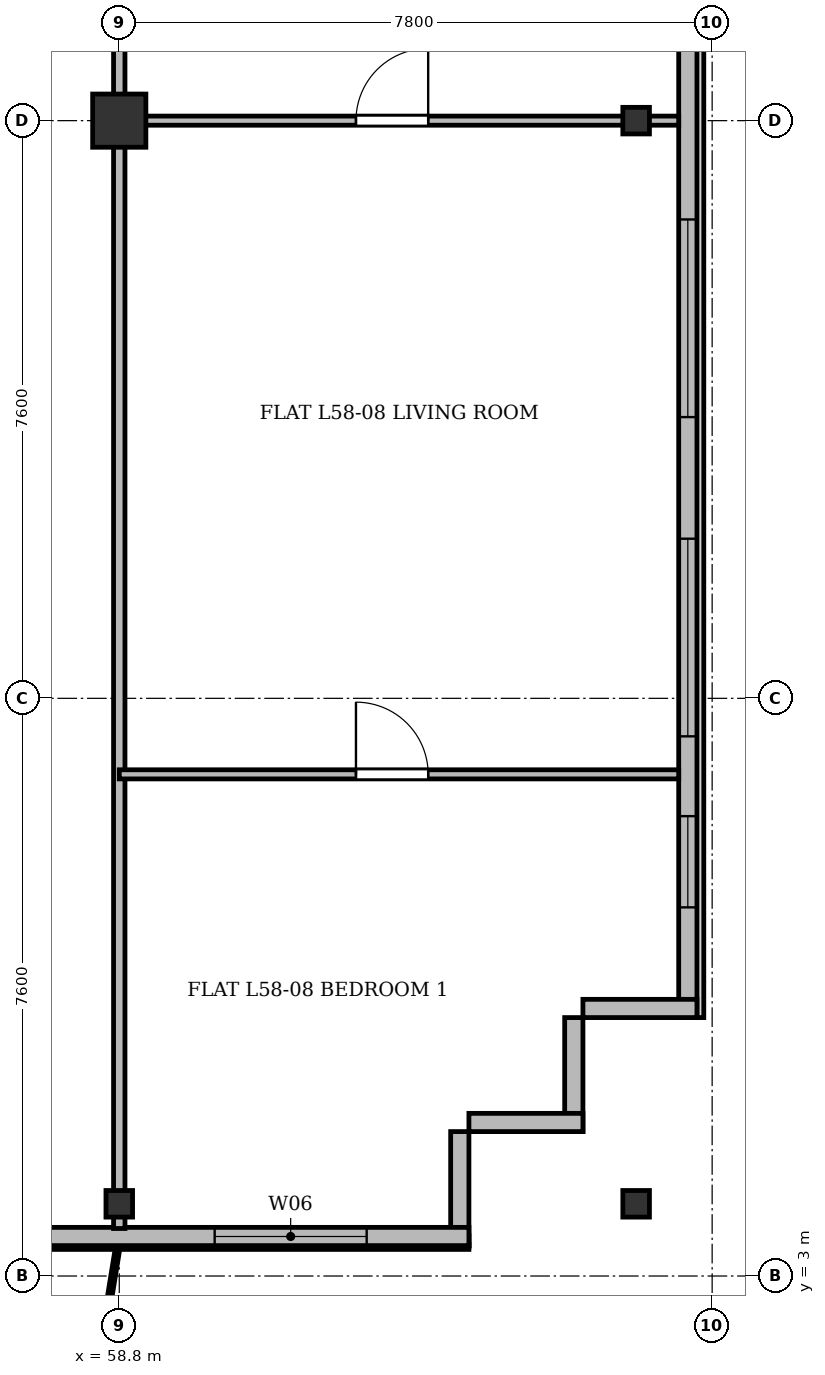
"""IFC4 building model, lengths in metres.
Left out: names, types, materials, properties, quantities, classifications, styles, units other than length and angle.
Written with IfcOpenShell. Run it as: python <this file> out.ifc"""

import sys

from ifc_helpers import new_model, si_unit, direction, frame, frame_2d, origin, origin_2d, place, context, subcontext, project, spatial, rectangle, i_section, extrude, source, transform, mapped, element, fill, save


model = new_model("IFC4")
c1 = context("Model", 3, precision=1e-05, world=origin(), true_north=direction((0.0, 1.0)))
c2 = subcontext(c1, "Body", "Model", "MODEL_VIEW")
j1 = project(units=[si_unit("LENGTHUNIT", "METRE"), si_unit("PLANEANGLEUNIT", "RADIAN")], contexts=[c1])
p1 = place(None, origin())
s1 = spatial("IfcSite", under=j1, at=p1, CompositionType="ELEMENT")
p2 = place(p1, origin())
s2 = spatial("IfcBuilding", under=s1, at=p2, CompositionType="ELEMENT")
p3 = place(p2, frame((0.0, 0.0, 222.9)))
s3 = spatial("IfcBuildingStorey", under=s2, at=p3, CompositionType="ELEMENT", Elevation=222.9)
m1 = source(origin(), c2, "Body", "SweptSolid", [
    extrude(i_section(OverallWidth=0.35, OverallDepth=0.35, WebThickness=0.018, FlangeThickness=0.028, at=origin_2d()), origin(), (0.0, 0.0, 1.0), 3.6),
])
p4 = place(p3, frame((58.8, 3.95, 0.0), z_axis=(0.0, 0.0, 1.0), x_axis=(1.0, 0.0, 0.0)))
e1 = element("IfcColumn", 1, at=p4, inside=s3, PredefinedType="COLUMN", context=c2, shape_type="MappedRepresentation", body=[
    mapped(m1, transform((0.0, 0.0, 0.0), x_axis=(1.0, 0.0, 0.0), y_axis=(0.0, 1.0, 0.0), z_axis=(0.0, 0.0, 1.0), scale=1.0)),
])
m2 = source(origin(), c2, "Body", "SweptSolid", [
    extrude(rectangle(XDim=0.7, YDim=0.7, at=origin_2d()), origin(), (0.0, 0.0, 1.0), 3.6),
])
p5 = place(p3, frame((58.8, 18.2, 0.0), z_axis=(0.0, 0.0, 1.0), x_axis=(1.0, 0.0, 0.0)))
e2 = element("IfcColumn", 2, at=p5, inside=s3, PredefinedType="COLUMN", context=c2, shape_type="MappedRepresentation", body=[
    mapped(m2, transform((0.0, 0.0, 0.0), x_axis=(1.0, 0.0, 0.0), y_axis=(0.0, 1.0, 0.0), z_axis=(0.0, 0.0, 1.0), scale=1.0)),
])
for number, where, z_axis, x_axis in (
    (3, (65.6, 3.95, 0.0), (0.0, 0.0, 1.0), (1.0, 0.0, 0.0)),
    (4, (65.6, 18.2, 0.0), (0.0, 0.0, 1.0), (1.0, 0.0, 0.0)),
):
    element("IfcColumn", number, at=place(p3, frame(where, z_axis=z_axis, x_axis=x_axis)), inside=s3, PredefinedType="COLUMN", context=c2, shape_type="MappedRepresentation", body=[
        mapped(m1, transform((0.0, 0.0, 0.0), x_axis=(1.0, 0.0, 0.0), y_axis=(0.0, 1.0, 0.0), z_axis=(0.0, 0.0, 1.0), scale=1.0)),
    ])
p6 = place(p3, frame((66.28, 45.5, 0.0), z_axis=(0.0, 0.0, 1.0), x_axis=(0.0, -1.0, 0.0)))
e5 = element("IfcWall", 5, at=p6, inside=s3, PredefinedType="SOLIDWALL", context=c2, shape_type="SweptSolid", body=[
    extrude(rectangle(XDim=39.1, YDim=0.24, at=frame_2d((19.55, 0.0))), origin(), (0.0, 0.0, 1.0), 3.36),
])
p7 = place(p6, frame((36.45, 0.0, 0.92)))
e6 = element("IfcOpeningElement", 6, at=p7, cuts=e5, PredefinedType="OPENING", context=c2, shape_type="SweptSolid", body=[
    extrude(rectangle(XDim=1.2, YDim=1.65, at=frame_2d((0.6, 0.825))), frame((0.0, 0.13, 0.0), z_axis=(0.0, -1.0, 0.0), x_axis=(1.0, 0.0, 0.0)), (0.0, 0.0, 1.0), 0.26),
])
p8 = place(p6, frame((32.8, 0.0, 0.92)))
e7 = element("IfcOpeningElement", 7, at=p8, cuts=e5, PredefinedType="OPENING", context=c2, shape_type="SweptSolid", body=[
    extrude(rectangle(XDim=2.6, YDim=1.9, at=frame_2d((1.3, 0.95))), frame((0.0, 0.13, 0.0), z_axis=(0.0, -1.0, 0.0), x_axis=(1.0, 0.0, 0.0)), (0.0, 0.0, 1.0), 0.26),
])
p9 = place(p6, frame((28.6, 0.0, 0.92)))
e8 = element("IfcOpeningElement", 8, at=p9, cuts=e5, PredefinedType="OPENING", context=c2, shape_type="SweptSolid", body=[
    extrude(rectangle(XDim=2.6, YDim=1.9, at=frame_2d((1.3, 0.95))), frame((0.0, 0.13, 0.0), z_axis=(0.0, -1.0, 0.0), x_axis=(1.0, 0.0, 0.0)), (0.0, 0.0, 1.0), 0.26),
])
p10 = place(p6, frame((21.4, 0.0, 0.92)))
e9 = element("IfcOpeningElement", 9, at=p10, cuts=e5, PredefinedType="OPENING", context=c2, shape_type="SweptSolid", body=[
    extrude(rectangle(XDim=2.6, YDim=1.9, at=frame_2d((1.3, 0.95))), frame((0.0, 0.13, 0.0), z_axis=(0.0, -1.0, 0.0), x_axis=(1.0, 0.0, 0.0)), (0.0, 0.0, 1.0), 0.26),
])
p11 = place(p6, frame((7.4, 0.0, 0.92)))
e10 = element("IfcOpeningElement", 10, at=p11, cuts=e5, PredefinedType="OPENING", context=c2, shape_type="SweptSolid", body=[
    extrude(rectangle(XDim=2.6, YDim=1.9, at=frame_2d((1.3, 0.95))), frame((0.0, 0.13, 0.0), z_axis=(0.0, -1.0, 0.0), x_axis=(1.0, 0.0, 0.0)), (0.0, 0.0, 1.0), 0.26),
])
p12 = place(p6, frame((4.5, 0.0, 0.92)))
e11 = element("IfcOpeningElement", 11, at=p12, cuts=e5, PredefinedType="OPENING", context=c2, shape_type="SweptSolid", body=[
    extrude(rectangle(XDim=1.2, YDim=1.65, at=frame_2d((0.6, 0.825))), frame((0.0, 0.13, 0.0), z_axis=(0.0, -1.0, 0.0), x_axis=(1.0, 0.0, 0.0)), (0.0, 0.0, 1.0), 0.26),
])
p13 = place(p6, frame((1.15, 0.0, 0.92)))
e12 = element("IfcOpeningElement", 12, at=p13, cuts=e5, PredefinedType="OPENING", context=c2, shape_type="SweptSolid", body=[
    extrude(rectangle(XDim=1.2, YDim=1.65, at=frame_2d((0.6, 0.825))), frame((0.0, 0.13, 0.0), z_axis=(0.0, -1.0, 0.0), x_axis=(1.0, 0.0, 0.0)), (0.0, 0.0, 1.0), 0.26),
])
p14 = place(p3, frame((66.4, 6.52, 0.0), z_axis=(0.0, 0.0, 1.0), x_axis=(-1.0, 0.0, 0.0)))
e13 = element("IfcWall", 13, at=p14, inside=s3, PredefinedType="SOLIDWALL", context=c2, shape_type="SweptSolid", body=[
    extrude(rectangle(XDim=1.5, YDim=0.24, at=frame_2d((0.75, 0.0))), origin(), (0.0, 0.0, 1.0), 2.86),
])
for number, where, z_axis, x_axis in (
    (14, (64.78, 6.4, 0.0), (0.0, 0.0, 1.0), (0.0, -1.0, 0.0)),
    (15, (64.9, 5.02, 0.0), (0.0, 0.0, 1.0), (-1.0, 0.0, 0.0)),
):
    element("IfcWall", number, at=place(p3, frame(where, z_axis=z_axis, x_axis=x_axis)), inside=s3, PredefinedType="SOLIDWALL", context=c2, shape_type="SweptSolid", body=[
        extrude(rectangle(XDim=1.5, YDim=0.24, at=frame_2d((0.75, 0.0))), origin(), (0.0, 0.0, 1.0), 3.36),
    ])
p15 = place(p3, frame((63.28, 4.9, 0.0), z_axis=(0.0, 0.0, 1.0), x_axis=(0.0, -1.0, 0.0)))
e16 = element("IfcWall", 16, at=p15, inside=s3, PredefinedType="SOLIDWALL", context=c2, shape_type="SweptSolid", body=[
    extrude(rectangle(XDim=1.5, YDim=0.24, at=frame_2d((0.75, 0.0))), origin(), (0.0, 0.0, 1.0), 2.91),
])
p16 = place(p3, frame((63.4, 3.52, 0.0), z_axis=(0.0, 0.0, 1.0), x_axis=(-1.0, 0.0, 0.0)))
e17 = element("IfcWall", 17, at=p16, inside=s3, PredefinedType="SOLIDWALL", context=c2, shape_type="SweptSolid", body=[
    extrude(rectangle(XDim=52.4, YDim=0.24, at=frame_2d((26.2, 0.0))), origin(), (0.0, 0.0, 1.0), 3.36),
])
p17 = place(p16, frame((1.345, 0.0, 0.9)))
e18 = element("IfcOpeningElement", 18, at=p17, cuts=e17, PredefinedType="OPENING", context=c2, shape_type="SweptSolid", body=[
    extrude(rectangle(XDim=2.0, YDim=1.95, at=frame_2d((1.0, 0.975))), frame((0.0, 0.13, 0.0), z_axis=(0.0, -1.0, 0.0), x_axis=(1.0, 0.0, 0.0)), (0.0, 0.0, 1.0), 0.26),
])
p18 = place(p16, frame((7.675, 0.0, 0.9)))
e19 = element("IfcOpeningElement", 19, at=p18, cuts=e17, PredefinedType="OPENING", context=c2, shape_type="SweptSolid", body=[
    extrude(rectangle(XDim=1.65, YDim=1.85, at=frame_2d((0.825, 0.925))), frame((0.0, 0.13, 0.0), z_axis=(0.0, -1.0, 0.0), x_axis=(1.0, 0.0, 0.0)), (0.0, 0.0, 1.0), 0.26),
])
p19 = place(p16, frame((13.42, 0.0, 0.0)))
e20 = element("IfcOpeningElement", 20, at=p19, cuts=e17, PredefinedType="OPENING", context=c2, shape_type="SweptSolid", body=[
    extrude(rectangle(XDim=1.2, YDim=2.2, at=frame_2d((0.6, 1.1))), frame((0.0, 0.13, 0.0), z_axis=(0.0, -1.0, 0.0), x_axis=(1.0, 0.0, 0.0)), (0.0, 0.0, 1.0), 0.26),
])
p20 = place(p16, frame((15.25, 0.0, 0.9)))
e21 = element("IfcOpeningElement", 21, at=p20, cuts=e17, PredefinedType="OPENING", context=c2, shape_type="SweptSolid", body=[
    extrude(rectangle(XDim=1.5, YDim=1.75, at=frame_2d((0.75, 0.875))), frame((0.0, 0.13, 0.0), z_axis=(0.0, -1.0, 0.0), x_axis=(1.0, 0.0, 0.0)), (0.0, 0.0, 1.0), 0.26),
])
p21 = place(p16, frame((17.65, 0.0, 0.9)))
e22 = element("IfcOpeningElement", 22, at=p21, cuts=e17, PredefinedType="OPENING", context=c2, shape_type="SweptSolid", body=[
    extrude(rectangle(XDim=1.5, YDim=1.75, at=frame_2d((0.75, 0.875))), frame((0.0, 0.13, 0.0), z_axis=(0.0, -1.0, 0.0), x_axis=(1.0, 0.0, 0.0)), (0.0, 0.0, 1.0), 0.26),
])
p22 = place(p16, frame((20.25, 0.0, 0.9)))
e23 = element("IfcOpeningElement", 23, at=p22, cuts=e17, PredefinedType="OPENING", context=c2, shape_type="SweptSolid", body=[
    extrude(rectangle(XDim=2.0, YDim=1.95, at=frame_2d((1.0, 0.975))), frame((0.0, 0.13, 0.0), z_axis=(0.0, -1.0, 0.0), x_axis=(1.0, 0.0, 0.0)), (0.0, 0.0, 1.0), 0.26),
])
p23 = place(p16, frame((23.725, 0.0, 0.9)))
e24 = element("IfcOpeningElement", 24, at=p23, cuts=e17, PredefinedType="OPENING", context=c2, shape_type="SweptSolid", body=[
    extrude(rectangle(XDim=1.65, YDim=1.85, at=frame_2d((0.825, 0.925))), frame((0.0, 0.13, 0.0), z_axis=(0.0, -1.0, 0.0), x_axis=(1.0, 0.0, 0.0)), (0.0, 0.0, 1.0), 0.26),
])
p24 = place(p16, frame((28.6, 0.0, 0.9)))
e25 = element("IfcOpeningElement", 25, at=p24, cuts=e17, PredefinedType="OPENING", context=c2, shape_type="SweptSolid", body=[
    extrude(rectangle(XDim=1.8, YDim=1.8, at=frame_2d((0.9, 0.9))), frame((0.0, 0.13, 0.0), z_axis=(0.0, -1.0, 0.0), x_axis=(1.0, 0.0, 0.0)), (0.0, 0.0, 1.0), 0.26),
])
p25 = place(p16, frame((33.5, 0.0, 0.9)))
e26 = element("IfcOpeningElement", 26, at=p25, cuts=e17, PredefinedType="OPENING", context=c2, shape_type="SweptSolid", body=[
    extrude(rectangle(XDim=2.2, YDim=1.8, at=frame_2d((1.1, 0.9))), frame((0.0, 0.13, 0.0), z_axis=(0.0, -1.0, 0.0), x_axis=(1.0, 0.0, 0.0)), (0.0, 0.0, 1.0), 0.26),
])
p26 = place(p16, frame((37.45, 0.0, 0.9)))
e27 = element("IfcOpeningElement", 27, at=p26, cuts=e17, PredefinedType="OPENING", context=c2, shape_type="SweptSolid", body=[
    extrude(rectangle(XDim=1.5, YDim=1.75, at=frame_2d((0.75, 0.875))), frame((0.0, 0.13, 0.0), z_axis=(0.0, -1.0, 0.0), x_axis=(1.0, 0.0, 0.0)), (0.0, 0.0, 1.0), 0.26),
])
p27 = place(p16, frame((41.09, 0.0, 0.0)))
e28 = element("IfcOpeningElement", 28, at=p27, cuts=e17, PredefinedType="OPENING", context=c2, shape_type="SweptSolid", body=[
    extrude(rectangle(XDim=1.2, YDim=2.2, at=frame_2d((0.6, 1.1))), frame((0.0, 0.13, 0.0), z_axis=(0.0, -1.0, 0.0), x_axis=(1.0, 0.0, 0.0)), (0.0, 0.0, 1.0), 0.26),
])
p28 = place(p16, frame((43.075, 0.0, 0.9)))
e29 = element("IfcOpeningElement", 29, at=p28, cuts=e17, PredefinedType="OPENING", context=c2, shape_type="SweptSolid", body=[
    extrude(rectangle(XDim=1.65, YDim=1.85, at=frame_2d((0.825, 0.925))), frame((0.0, 0.13, 0.0), z_axis=(0.0, -1.0, 0.0), x_axis=(1.0, 0.0, 0.0)), (0.0, 0.0, 1.0), 0.26),
])
p29 = place(p16, frame((45.6, 0.0, 0.9)))
e30 = element("IfcOpeningElement", 30, at=p29, cuts=e17, PredefinedType="OPENING", context=c2, shape_type="SweptSolid", body=[
    extrude(rectangle(XDim=1.8, YDim=1.8, at=frame_2d((0.9, 0.9))), frame((0.0, 0.13, 0.0), z_axis=(0.0, -1.0, 0.0), x_axis=(1.0, 0.0, 0.0)), (0.0, 0.0, 1.0), 0.26),
])
p30 = place(p16, frame((48.955, 0.0, 0.9)))
e31 = element("IfcOpeningElement", 31, at=p30, cuts=e17, PredefinedType="OPENING", context=c2, shape_type="SweptSolid", body=[
    extrude(rectangle(XDim=2.2, YDim=1.8, at=frame_2d((1.1, 0.9))), frame((0.0, 0.13, 0.0), z_axis=(0.0, -1.0, 0.0), x_axis=(1.0, 0.0, 0.0)), (0.0, 0.0, 1.0), 0.26),
])
p31 = place(p3, frame((58.8, 3.625, 0.0), z_axis=(0.0, 0.0, 1.0), x_axis=(0.0, 1.0, 0.0)))
e32 = element("IfcWall", 32, at=p31, inside=s3, PredefinedType="PARTITIONING", context=c2, shape_type="SweptSolid", body=[
    extrude(rectangle(XDim=27.375, YDim=0.15, at=frame_2d((13.688, 0.0))), origin(), (0.0, 0.0, 1.0), 2.86),
])
p32 = place(p3, frame((58.8, 18.2, 0.0), z_axis=(0.0, 0.0, 1.0), x_axis=(1.0, 0.0, 0.0)))
e33 = element("IfcWall", 33, at=p32, inside=s3, PredefinedType="PARTITIONING", context=c2, shape_type="SweptSolid", body=[
    extrude(rectangle(XDim=7.36, YDim=0.12, at=frame_2d((3.68, 0.0))), origin(), (0.0, 0.0, 1.0), 2.91),
])
p33 = place(p32, frame((3.114, 0.0, 0.0)))
e34 = element("IfcOpeningElement", 34, at=p33, cuts=e33, PredefinedType="OPENING", context=c2, shape_type="SweptSolid", body=[
    extrude(rectangle(XDim=0.95, YDim=2.15, at=frame_2d((0.475, 1.075))), frame((0.0, 0.07, 0.0), z_axis=(0.0, -1.0, 0.0), x_axis=(1.0, 0.0, 0.0)), (0.0, 0.0, 1.0), 0.14),
])
p34 = place(p3, frame((58.8, 9.6, 0.0), z_axis=(0.0, 0.0, 1.0), x_axis=(1.0, 0.0, 0.0)))
e35 = element("IfcWall", 35, at=p34, inside=s3, PredefinedType="PARTITIONING", context=c2, shape_type="SweptSolid", body=[
    extrude(rectangle(XDim=7.36, YDim=0.12, at=frame_2d((3.68, 0.0))), origin(), (0.0, 0.0, 1.0), 2.86),
])
p35 = place(p34, frame((3.114, 0.0, 0.0)))
e36 = element("IfcOpeningElement", 36, at=p35, cuts=e35, PredefinedType="OPENING", context=c2, shape_type="SweptSolid", body=[
    extrude(rectangle(XDim=0.95, YDim=2.15, at=frame_2d((0.475, 1.075))), frame((0.0, 0.07, 0.0), z_axis=(0.0, -1.0, 0.0), x_axis=(1.0, 0.0, 0.0)), (0.0, 0.0, 1.0), 0.14),
])
m3 = source(origin(), c2, "Body", "SweptSolid", [
    extrude(rectangle(XDim=1.2, YDim=1.65, at=frame_2d((0.6, 0.825))), frame((0.0, 0.03, 0.0), z_axis=(0.0, -1.0, 0.0), x_axis=(1.0, 0.0, 0.0)), (0.0, 0.0, 1.0), 0.06),
])
p36 = place(p7, origin())
e37 = element("IfcWindow", 37, at=p36, inside=s3, PartitioningType="SINGLE_PANEL", PredefinedType="WINDOW", context=c2, shape_type="MappedRepresentation", body=[
    mapped(m3, transform((0.0, 0.0, 0.0), x_axis=(1.0, 0.0, 0.0), y_axis=(0.0, 1.0, 0.0), z_axis=(0.0, 0.0, 1.0), scale=1.0)),
])
fill(e6, e37)
m4 = source(origin(), c2, "Body", "SweptSolid", [
    extrude(rectangle(XDim=2.6, YDim=1.9, at=frame_2d((1.3, 0.95))), frame((0.0, 0.03, 0.0), z_axis=(0.0, -1.0, 0.0), x_axis=(1.0, 0.0, 0.0)), (0.0, 0.0, 1.0), 0.06),
])
p37 = place(p8, origin())
e38 = element("IfcWindow", 38, at=p37, inside=s3, PartitioningType="SINGLE_PANEL", PredefinedType="WINDOW", context=c2, shape_type="MappedRepresentation", body=[
    mapped(m4, transform((0.0, 0.0, 0.0), x_axis=(1.0, 0.0, 0.0), y_axis=(0.0, 1.0, 0.0), z_axis=(0.0, 0.0, 1.0), scale=1.0)),
])
fill(e7, e38)
p38 = place(p9, origin())
e39 = element("IfcWindow", 39, at=p38, inside=s3, PartitioningType="SINGLE_PANEL", PredefinedType="WINDOW", context=c2, shape_type="MappedRepresentation", body=[
    mapped(m4, transform((0.0, 0.0, 0.0), x_axis=(1.0, 0.0, 0.0), y_axis=(0.0, 1.0, 0.0), z_axis=(0.0, 0.0, 1.0), scale=1.0)),
])
fill(e8, e39)
m5 = source(origin(), c2, "Body", "SweptSolid", [
    extrude(rectangle(XDim=2.0, YDim=1.95, at=frame_2d((1.0, 0.975))), frame((0.0, 0.03, 0.0), z_axis=(0.0, -1.0, 0.0), x_axis=(1.0, 0.0, 0.0)), (0.0, 0.0, 1.0), 0.06),
])
p39 = place(p17, origin())
e40 = element("IfcWindow", 40, at=p39, inside=s3, PartitioningType="SINGLE_PANEL", PredefinedType="WINDOW", context=c2, shape_type="MappedRepresentation", body=[
    mapped(m5, transform((0.0, 0.0, 0.0), x_axis=(1.0, 0.0, 0.0), y_axis=(0.0, 1.0, 0.0), z_axis=(0.0, 0.0, 1.0), scale=1.0)),
])
fill(e18, e40)
m6 = source(origin(), c2, "Body", "SweptSolid", [
    extrude(rectangle(XDim=0.95, YDim=2.15, at=frame_2d((0.475, 1.075))), frame((0.0, 0.025, 0.0), z_axis=(0.0, -1.0, 0.0), x_axis=(1.0, 0.0, 0.0)), (0.0, 0.0, 1.0), 0.05),
])
p40 = place(p33, origin())
e41 = element("IfcDoor", 41, at=p40, inside=s3, OperationType="SINGLE_SWING_RIGHT", PredefinedType="DOOR", context=c2, shape_type="MappedRepresentation", body=[
    mapped(m6, transform((0.0, 0.0, 0.0), x_axis=(1.0, 0.0, 0.0), y_axis=(0.0, 1.0, 0.0), z_axis=(0.0, 0.0, 1.0), scale=1.0)),
])
fill(e34, e41)
p41 = place(p35, origin())
e42 = element("IfcDoor", 42, at=p41, inside=s3, OperationType="SINGLE_SWING_LEFT", PredefinedType="DOOR", context=c2, shape_type="MappedRepresentation", body=[
    mapped(m6, transform((0.0, 0.0, 0.0), x_axis=(1.0, 0.0, 0.0), y_axis=(0.0, 1.0, 0.0), z_axis=(0.0, 0.0, 1.0), scale=1.0)),
])
fill(e36, e42)
save(model, sys.argv[1])
